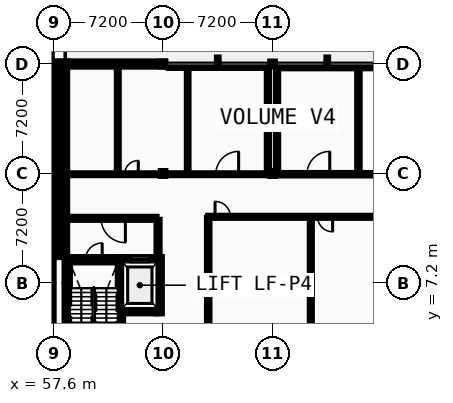
"""IFC4 building model, lengths in metres.
Left out: names, types, materials, properties, quantities, classifications, styles, units other than length and angle.
Written with IfcOpenShell. Run it as: python <this file> out.ifc"""

import sys

from ifc_helpers import new_model, si_unit, direction, frame, frame_2d, origin, origin_2d, place, context, subcontext, project, spatial, rectangle, i_section, extrude, element, fill, save


model = new_model("IFC4")
c1 = context("Model", 3, precision=1e-05, world=origin(), true_north=direction((0.0, 1.0)))
c2 = subcontext(c1, "Body", "Model", "MODEL_VIEW")
j1 = project(units=[si_unit("LENGTHUNIT", "METRE"), si_unit("PLANEANGLEUNIT", "RADIAN")], contexts=[c1])
p1 = place(None, origin())
s1 = spatial("IfcSite", under=j1, at=p1, CompositionType="ELEMENT")
p2 = place(p1, origin())
s2 = spatial("IfcBuilding", under=s1, at=p2, CompositionType="ELEMENT")
p3 = place(p2, frame((0.0, 0.0, 14.0)))
s3 = spatial("IfcBuildingStorey", under=s2, at=p3, CompositionType="ELEMENT", Elevation=14.0)
for number, where, z_axis, x_axis in (
    (1, (57.6, 14.4, 0.0), (0.0, 0.0, 1.0), (1.0, 0.0, 0.0)),
    (2, (57.6, 21.6, 0.0), (0.0, 0.0, 1.0), (1.0, 0.0, 0.0)),
    (3, (58.32, 14.4, 0.0), (0.0, 0.0, 1.0), (1.0, 0.0, 0.0)),
    (4, (58.32, 21.6, 0.0), (0.0, 0.0, 1.0), (1.0, 0.0, 0.0)),
    (5, (64.8, 14.4, 0.0), (0.0, 0.0, 1.0), (1.0, 0.0, 0.0)),
    (6, (64.8, 21.6, 0.0), (0.0, 0.0, 1.0), (1.0, 0.0, 0.0)),
    (7, (72.0, 7.2, 0.0), (0.0, 0.0, 1.0), (1.0, 0.0, 0.0)),
    (8, (72.0, 14.4, 0.0), (0.0, 0.0, 1.0), (1.0, 0.0, 0.0)),
    (9, (72.0, 21.6, 0.0), (0.0, 0.0, 1.0), (1.0, 0.0, 0.0)),
):
    element("IfcColumn", number, at=place(p3, frame(where, z_axis=z_axis, x_axis=x_axis)), inside=s3, PredefinedType="COLUMN", context=c2, shape_type="SweptSolid", body=[
        extrude(i_section(OverallWidth=0.3, OverallDepth=0.32, WebThickness=0.011, FlangeThickness=0.021, FilletRadius=0.027, at=origin_2d()), origin(), (0.0, 0.0, 1.0), 4.4),
    ])
p4 = place(p3, frame((57.6, 8.9, 0.0), z_axis=(0.0, 0.0, 1.0), x_axis=(0.0, 1.0, 0.0)))
e10 = element("IfcWall", 10, at=p4, inside=s3, PredefinedType="STANDARD", context=c2, shape_type="SweptSolid", body=[
    extrude(rectangle(XDim=5.5, YDim=0.34, at=frame_2d((2.75, 0.0))), origin(), (0.0, 0.0, 1.0), 4.2),
])
p5 = place(p3, frame((57.6, 14.4, 0.0), z_axis=(0.0, 0.0, 1.0), x_axis=(0.0, 1.0, 0.0)))
e11 = element("IfcWall", 11, at=p5, inside=s3, PredefinedType="STANDARD", context=c2, shape_type="SweptSolid", body=[
    extrude(rectangle(XDim=7.37, YDim=0.34, at=frame_2d((3.685, 0.0))), origin(), (0.0, 0.0, 1.0), 3.895),
])
p6 = place(p5, frame((1.679, 0.0, 0.95)))
e12 = element("IfcOpeningElement", 12, at=p6, cuts=e11, PredefinedType="OPENING", context=c2, shape_type="SweptSolid", body=[
    extrude(rectangle(XDim=1.064, YDim=1.404, at=frame_2d((0.532, 0.702))), frame((0.0, 0.18, 0.0), z_axis=(0.0, -1.0, 0.0), x_axis=(1.0, 0.0, 0.0)), (0.0, 0.0, 1.0), 0.36),
])
p7 = place(p5, frame((4.627, 0.0, 0.95)))
e13 = element("IfcOpeningElement", 13, at=p7, cuts=e11, PredefinedType="OPENING", context=c2, shape_type="SweptSolid", body=[
    extrude(rectangle(XDim=1.064, YDim=1.404, at=frame_2d((0.532, 0.702))), frame((0.0, 0.18, 0.0), z_axis=(0.0, -1.0, 0.0), x_axis=(1.0, 0.0, 0.0)), (0.0, 0.0, 1.0), 0.36),
])
p8 = place(p3, frame((64.91, 21.6, 0.0), z_axis=(0.0, 0.0, 1.0), x_axis=(-1.0, 0.0, 0.0)))
e14 = element("IfcWall", 14, at=p8, inside=s3, PredefinedType="STANDARD", context=c2, shape_type="SweptSolid", body=[
    extrude(rectangle(XDim=6.42, YDim=0.34, at=frame_2d((3.21, 0.0))), origin(), (0.0, 0.0, 1.0), 3.935),
])
p9 = place(p3, frame((58.32, 14.4, 0.0), z_axis=(0.0, 0.0, 1.0), x_axis=(0.0, -1.0, 0.0)))
e15 = element("IfcWall", 15, at=p9, inside=s3, PredefinedType="STANDARD", context=c2, shape_type="SweptSolid", body=[
    extrude(rectangle(XDim=5.5, YDim=0.34, at=frame_2d((2.75, 0.0))), origin(), (0.0, 0.0, 1.0), 4.2),
])
p10 = place(p3, frame((58.32, 21.77, 0.0), z_axis=(0.0, 0.0, 1.0), x_axis=(0.0, -1.0, 0.0)))
e16 = element("IfcWall", 16, at=p10, inside=s3, PredefinedType="STANDARD", context=c2, shape_type="SweptSolid", body=[
    extrude(rectangle(XDim=7.37, YDim=0.34, at=frame_2d((3.685, 0.0))), origin(), (0.0, 0.0, 1.0), 3.895),
])
p11 = place(p10, frame((1.764, 0.0, 0.95)))
e17 = element("IfcOpeningElement", 17, at=p11, cuts=e16, PredefinedType="OPENING", context=c2, shape_type="SweptSolid", body=[
    extrude(rectangle(XDim=0.894, YDim=1.368, at=frame_2d((0.447, 0.684))), frame((0.0, 0.18, 0.0), z_axis=(0.0, -1.0, 0.0), x_axis=(1.0, 0.0, 0.0)), (0.0, 0.0, 1.0), 0.36),
])
p12 = place(p10, frame((4.712, 0.0, 0.95)))
e18 = element("IfcOpeningElement", 18, at=p12, cuts=e16, PredefinedType="OPENING", context=c2, shape_type="SweptSolid", body=[
    extrude(rectangle(XDim=0.894, YDim=1.368, at=frame_2d((0.447, 0.684))), frame((0.0, 0.18, 0.0), z_axis=(0.0, -1.0, 0.0), x_axis=(1.0, 0.0, 0.0)), (0.0, 0.0, 1.0), 0.36),
])
p13 = place(p3, frame((57.425, 0.4, 0.0), z_axis=(0.0, 0.0, 1.0), x_axis=(0.0, 1.0, 0.0)))
e19 = element("IfcWall", 19, at=p13, inside=s3, PredefinedType="SHEAR", context=c2, shape_type="SweptSolid", body=[
    extrude(rectangle(XDim=8.5, YDim=0.35, at=frame_2d((4.25, 0.0))), origin(), (0.0, 0.0, 1.0), 4.2),
])
p14 = place(p3, frame((58.67, 8.725, 0.0), z_axis=(0.0, 0.0, 1.0), x_axis=(1.0, 0.0, 0.0)))
e20 = element("IfcWall", 20, at=p14, inside=s3, PredefinedType="SHEAR", context=c2, shape_type="SweptSolid", body=[
    extrude(rectangle(XDim=3.15, YDim=0.35, at=frame_2d((1.575, 0.0))), origin(), (0.0, 0.0, 1.0), 4.2),
])
p15 = place(p14, frame((1.025, 0.0, 0.0)))
e21 = element("IfcOpeningElement", 21, at=p15, cuts=e20, PredefinedType="OPENING", context=c2, shape_type="SweptSolid", body=[
    extrude(rectangle(XDim=1.1, YDim=2.15, at=frame_2d((0.55, 1.075))), frame((0.0, 0.185, 0.0), z_axis=(0.0, -1.0, 0.0), x_axis=(1.0, 0.0, 0.0)), (0.0, 0.0, 1.0), 0.37),
])
for number, where, z_axis, x_axis in (
    (22, (58.495, 0.4, 0.0), (0.0, 0.0, 1.0), (0.0, 1.0, 0.0)),
    (23, (61.995, 0.4, 0.0), (0.0, 0.0, 1.0), (0.0, 1.0, 0.0)),
):
    element("IfcWall", number, at=place(p3, frame(where, z_axis=z_axis, x_axis=x_axis)), inside=s3, PredefinedType="SHEAR", context=c2, shape_type="SweptSolid", body=[
        extrude(rectangle(XDim=8.5, YDim=0.35, at=frame_2d((4.25, 0.0))), origin(), (0.0, 0.0, 1.0), 4.2),
    ])
p16 = place(p3, frame((62.17, 5.375, 0.0), z_axis=(0.0, 0.0, 1.0), x_axis=(1.0, 0.0, 0.0)))
e24 = element("IfcWall", 24, at=p16, inside=s3, PredefinedType="SHEAR", context=c2, shape_type="SweptSolid", body=[
    extrude(rectangle(XDim=2.2, YDim=0.35, at=frame_2d((1.1, 0.0))), origin(), (0.0, 0.0, 1.0), 4.2),
])
p17 = place(p3, frame((62.17, 8.725, 0.0), z_axis=(0.0, 0.0, 1.0), x_axis=(1.0, 0.0, 0.0)))
e25 = element("IfcWall", 25, at=p17, inside=s3, PredefinedType="SHEAR", context=c2, shape_type="SweptSolid", body=[
    extrude(rectangle(XDim=2.2, YDim=0.35, at=frame_2d((1.1, 0.0))), origin(), (0.0, 0.0, 1.0), 4.2),
])
p18 = place(p17, frame((0.5, 0.0, 0.0)))
e26 = element("IfcOpeningElement", 26, at=p18, cuts=e25, PredefinedType="OPENING", context=c2, shape_type="SweptSolid", body=[
    extrude(rectangle(XDim=1.2, YDim=2.2, at=frame_2d((0.6, 1.1))), frame((0.0, 0.185, 0.0), z_axis=(0.0, -1.0, 0.0), x_axis=(1.0, 0.0, 0.0)), (0.0, 0.0, 1.0), 0.37),
])
p19 = place(p3, frame((64.545, 5.2, 0.0), z_axis=(0.0, 0.0, 1.0), x_axis=(0.0, 1.0, 0.0)))
e27 = element("IfcWall", 27, at=p19, inside=s3, PredefinedType="SHEAR", context=c2, shape_type="SweptSolid", body=[
    extrude(rectangle(XDim=3.7, YDim=0.35, at=frame_2d((1.85, 0.0))), origin(), (0.0, 0.0, 1.0), 4.2),
])
p20 = place(p3, frame((58.67, 11.45, 0.0), z_axis=(0.0, 0.0, 1.0), x_axis=(1.0, 0.0, 0.0)))
e28 = element("IfcWall", 28, at=p20, inside=s3, PredefinedType="PARTITIONING", context=c2, shape_type="SweptSolid", body=[
    extrude(rectangle(XDim=5.7, YDim=0.2, at=frame_2d((2.85, 0.0))), origin(), (0.0, 0.0, 1.0), 4.2),
])
p21 = place(p20, frame((2.05, 0.0, 0.0)))
e29 = element("IfcOpeningElement", 29, at=p21, cuts=e28, PredefinedType="OPENING", context=c2, shape_type="SweptSolid", body=[
    extrude(rectangle(XDim=1.6, YDim=2.2, at=frame_2d((0.8, 1.1))), frame((0.0, 0.11, 0.0), z_axis=(0.0, -1.0, 0.0), x_axis=(1.0, 0.0, 0.0)), (0.0, 0.0, 1.0), 0.22),
])
p22 = place(p3, frame((64.47, 8.9, 0.0), z_axis=(0.0, 0.0, 1.0), x_axis=(0.0, 1.0, 0.0)))
e30 = element("IfcWall", 30, at=p22, inside=s3, PredefinedType="PARTITIONING", context=c2, shape_type="SweptSolid", body=[
    extrude(rectangle(XDim=2.45, YDim=0.2, at=frame_2d((1.225, 0.0))), origin(), (0.0, 0.0, 1.0), 4.2),
])
p23 = place(p3, frame((67.77, 11.55, 0.0), z_axis=(0.0, 0.0, 1.0), x_axis=(1.0, 0.0, 0.0)))
e31 = element("IfcWall", 31, at=p23, inside=s3, PredefinedType="PARTITIONING", context=c2, shape_type="SweptSolid", body=[
    extrude(rectangle(XDim=12.46, YDim=0.135, at=frame_2d((6.23, 0.0))), origin(), (0.0, 0.0, 1.0), 4.2),
])
p24 = place(p23, frame((7.2, 0.0, 0.0)))
e32 = element("IfcOpeningElement", 32, at=p24, cuts=e31, PredefinedType="OPENING", context=c2, shape_type="SweptSolid", body=[
    extrude(rectangle(XDim=0.984, YDim=2.04, at=frame_2d((0.492, 1.02))), frame((0.0, 0.078, 0.0), z_axis=(0.0, -1.0, 0.0), x_axis=(1.0, 0.0, 0.0)), (0.0, 0.0, 1.0), 0.155),
])
p25 = place(p23, frame((0.45, 0.0, 0.0)))
e33 = element("IfcOpeningElement", 33, at=p25, cuts=e31, PredefinedType="OPENING", context=c2, shape_type="SweptSolid", body=[
    extrude(rectangle(XDim=1.01, YDim=2.04, at=frame_2d((0.505, 1.02))), frame((0.0, 0.078, 0.0), z_axis=(0.0, -1.0, 0.0), x_axis=(1.0, 0.0, 0.0)), (0.0, 0.0, 1.0), 0.155),
])
p26 = place(p3, frame((58.7, 14.35, 0.0), z_axis=(0.0, 0.0, 1.0), x_axis=(1.0, 0.0, 0.0)))
e34 = element("IfcWall", 34, at=p26, inside=s3, PredefinedType="PARTITIONING", context=c2, shape_type="SweptSolid", body=[
    extrude(rectangle(XDim=5.72, YDim=0.125, at=frame_2d((2.86, 0.0))), origin(), (0.0, 0.0, 1.0), 3.935),
])
p27 = place(p26, frame((1.67, 0.0, 0.0)))
e35 = element("IfcOpeningElement", 35, at=p27, cuts=e34, PredefinedType="OPENING", context=c2, shape_type="SweptSolid", body=[
    extrude(rectangle(XDim=1.0, YDim=2.1, at=frame_2d((0.5, 1.05))), frame((0.0, 0.073, 0.0), z_axis=(0.0, -1.0, 0.0), x_axis=(1.0, 0.0, 0.0)), (0.0, 0.0, 1.0), 0.145),
])
p28 = place(p26, frame((3.57, 0.0, 0.0)))
e36 = element("IfcOpeningElement", 36, at=p28, cuts=e34, PredefinedType="OPENING", context=c2, shape_type="SweptSolid", body=[
    extrude(rectangle(XDim=0.9, YDim=2.1, at=frame_2d((0.45, 1.05))), frame((0.0, 0.073, 0.0), z_axis=(0.0, -1.0, 0.0), x_axis=(1.0, 0.0, 0.0)), (0.0, 0.0, 1.0), 0.145),
])
p29 = place(p3, frame((65.18, 14.35, 0.0), z_axis=(0.0, 0.0, 1.0), x_axis=(1.0, 0.0, 0.0)))
e37 = element("IfcWall", 37, at=p29, inside=s3, PredefinedType="PARTITIONING", context=c2, shape_type="SweptSolid", body=[
    extrude(rectangle(XDim=6.44, YDim=0.125, at=frame_2d((3.22, 0.0))), origin(), (0.0, 0.0, 1.0), 3.935),
])
p30 = place(p29, frame((3.09, 0.0, 0.0)))
e38 = element("IfcOpeningElement", 38, at=p30, cuts=e37, PredefinedType="OPENING", context=c2, shape_type="SweptSolid", body=[
    extrude(rectangle(XDim=1.5, YDim=2.2, at=frame_2d((0.75, 1.1))), frame((0.0, 0.073, 0.0), z_axis=(0.0, -1.0, 0.0), x_axis=(1.0, 0.0, 0.0)), (0.0, 0.0, 1.0), 0.145),
])
p31 = place(p3, frame((72.38, 14.35, 0.0), z_axis=(0.0, 0.0, 1.0), x_axis=(1.0, 0.0, 0.0)))
e39 = element("IfcWall", 39, at=p31, inside=s3, PredefinedType="PARTITIONING", context=c2, shape_type="SweptSolid", body=[
    extrude(rectangle(XDim=6.44, YDim=0.16, at=frame_2d((3.22, 0.0))), origin(), (0.0, 0.0, 1.0), 3.935),
])
p32 = place(p31, frame((1.885, 0.0, 0.0)))
e40 = element("IfcOpeningElement", 40, at=p32, cuts=e39, PredefinedType="OPENING", context=c2, shape_type="SweptSolid", body=[
    extrude(rectangle(XDim=1.5, YDim=2.2, at=frame_2d((0.75, 1.1))), frame((0.0, 0.09, 0.0), z_axis=(0.0, -1.0, 0.0), x_axis=(1.0, 0.0, 0.0)), (0.0, 0.0, 1.0), 0.18),
])
p33 = place(p3, frame((65.18, 21.4, 0.0), z_axis=(0.0, 0.0, 1.0), x_axis=(1.0, 0.0, 0.0)))
e41 = element("IfcWall", 41, at=p33, inside=s3, PredefinedType="PARTITIONING", context=c2, shape_type="SweptSolid", body=[
    extrude(rectangle(XDim=6.44, YDim=0.11, at=frame_2d((3.22, 0.0))), origin(), (0.0, 0.0, 1.0), 3.935),
])
p34 = place(p3, frame((72.38, 21.4, 0.0), z_axis=(0.0, 0.0, 1.0), x_axis=(1.0, 0.0, 0.0)))
e42 = element("IfcWall", 42, at=p34, inside=s3, PredefinedType="PARTITIONING", context=c2, shape_type="SweptSolid", body=[
    extrude(rectangle(XDim=6.44, YDim=0.16, at=frame_2d((3.22, 0.0))), origin(), (0.0, 0.0, 1.0), 3.935),
])
p35 = place(p3, frame((61.82, 14.413, 0.0), z_axis=(0.0, 0.0, 1.0), x_axis=(0.0, 1.0, 0.0)))
e43 = element("IfcWall", 43, at=p35, inside=s3, PredefinedType="PARTITIONING", context=c2, shape_type="SweptSolid", body=[
    extrude(rectangle(XDim=6.987, YDim=0.125, at=frame_2d((3.494, 0.0))), origin(), (0.0, 0.0, 1.0), 4.2),
])
p36 = place(p3, frame((66.42, 14.413, 0.0), z_axis=(0.0, 0.0, 1.0), x_axis=(0.0, 1.0, 0.0)))
e44 = element("IfcWall", 44, at=p36, inside=s3, PredefinedType="PARTITIONING", context=c2, shape_type="SweptSolid", body=[
    extrude(rectangle(XDim=6.932, YDim=0.11, at=frame_2d((3.466, 0.0))), origin(), (0.0, 0.0, 1.0), 4.2),
])
p37 = place(p3, frame((67.77, 3.36, 0.0), z_axis=(0.0, 0.0, 1.0), x_axis=(0.0, 1.0, 0.0)))
e45 = element("IfcWall", 45, at=p37, inside=s3, PredefinedType="PARTITIONING", context=c2, shape_type="SweptSolid", body=[
    extrude(rectangle(XDim=8.122, YDim=0.16, at=frame_2d((4.061, 0.0))), origin(), (0.0, 0.0, 1.0), 4.2),
])
p38 = place(p3, frame((71.7, 14.78, 0.0), z_axis=(0.0, 0.0, 1.0), x_axis=(0.0, 1.0, 0.0)))
e46 = element("IfcWall", 46, at=p38, inside=s3, PredefinedType="PARTITIONING", context=c2, shape_type="SweptSolid", body=[
    extrude(rectangle(XDim=6.44, YDim=0.15, at=frame_2d((3.22, 0.0))), origin(), (0.0, 0.0, 1.0), 3.895),
])
p39 = place(p3, frame((72.3, 14.78, 0.0), z_axis=(0.0, 0.0, 1.0), x_axis=(0.0, 1.0, 0.0)))
e47 = element("IfcWall", 47, at=p39, inside=s3, PredefinedType="PARTITIONING", context=c2, shape_type="SweptSolid", body=[
    extrude(rectangle(XDim=6.44, YDim=0.142, at=frame_2d((3.22, 0.0))), origin(), (0.0, 0.0, 1.0), 3.895),
])
p40 = place(p3, frame((74.52, 0.2, 0.0), z_axis=(0.0, 0.0, 1.0), x_axis=(0.0, 1.0, 0.0)))
e48 = element("IfcWall", 48, at=p40, inside=s3, PredefinedType="PARTITIONING", context=c2, shape_type="SweptSolid", body=[
    extrude(rectangle(XDim=11.282, YDim=0.135, at=frame_2d((5.641, 0.0))), origin(), (0.0, 0.0, 1.0), 3.945),
])
p41 = place(p3, frame((77.65, 14.43, 0.0), z_axis=(0.0, 0.0, 1.0), x_axis=(0.0, 1.0, 0.0)))
e49 = element("IfcWall", 49, at=p41, inside=s3, PredefinedType="PARTITIONING", context=c2, shape_type="SweptSolid", body=[
    extrude(rectangle(XDim=6.89, YDim=0.16, at=frame_2d((3.445, 0.0))), origin(), (0.0, 0.0, 1.0), 4.2),
])
p42 = place(p6, origin())
e50 = element("IfcWindow", 50, at=p42, inside=s3, PartitioningType="SINGLE_PANEL", PredefinedType="WINDOW", context=c2, shape_type="SweptSolid", body=[
    extrude(rectangle(XDim=1.064, YDim=1.404, at=frame_2d((0.532, 0.702))), frame((0.0, 0.03, 0.0), z_axis=(0.0, -1.0, 0.0), x_axis=(1.0, 0.0, 0.0)), (0.0, 0.0, 1.0), 0.06),
])
fill(e12, e50)
p43 = place(p7, origin())
e51 = element("IfcWindow", 51, at=p43, inside=s3, PartitioningType="SINGLE_PANEL", PredefinedType="WINDOW", context=c2, shape_type="SweptSolid", body=[
    extrude(rectangle(XDim=1.064, YDim=1.404, at=frame_2d((0.532, 0.702))), frame((0.0, 0.03, 0.0), z_axis=(0.0, -1.0, 0.0), x_axis=(1.0, 0.0, 0.0)), (0.0, 0.0, 1.0), 0.06),
])
fill(e13, e51)
p44 = place(p11, origin())
e52 = element("IfcWindow", 52, at=p44, inside=s3, PartitioningType="SINGLE_PANEL", PredefinedType="WINDOW", context=c2, shape_type="SweptSolid", body=[
    extrude(rectangle(XDim=0.894, YDim=1.368, at=frame_2d((0.447, 0.684))), frame((0.0, 0.03, 0.0), z_axis=(0.0, -1.0, 0.0), x_axis=(1.0, 0.0, 0.0)), (0.0, 0.0, 1.0), 0.06),
])
fill(e17, e52)
p45 = place(p12, origin())
e53 = element("IfcWindow", 53, at=p45, inside=s3, PartitioningType="SINGLE_PANEL", PredefinedType="WINDOW", context=c2, shape_type="SweptSolid", body=[
    extrude(rectangle(XDim=0.894, YDim=1.368, at=frame_2d((0.447, 0.684))), frame((0.0, 0.03, 0.0), z_axis=(0.0, -1.0, 0.0), x_axis=(1.0, 0.0, 0.0)), (0.0, 0.0, 1.0), 0.06),
])
fill(e18, e53)
p46 = place(p15, frame((1.1, 0.0, 0.0), z_axis=(0.0, 0.0, 1.0), x_axis=(-1.0, 0.0, 0.0)))
e54 = element("IfcDoor", 54, at=p46, inside=s3, OperationType="SINGLE_SWING_RIGHT", PredefinedType="DOOR", context=c2, shape_type="SweptSolid", body=[
    extrude(rectangle(XDim=1.1, YDim=2.15, at=frame_2d((0.55, 1.075))), frame((0.0, 0.025, 0.0), z_axis=(0.0, -1.0, 0.0), x_axis=(1.0, 0.0, 0.0)), (0.0, 0.0, 1.0), 0.05),
])
fill(e21, e54)
p47 = place(p18, origin())
e55 = element("IfcDoor", 55, at=p47, inside=s3, OperationType="SLIDING_TO_RIGHT", PredefinedType="DOOR", context=c2, shape_type="SweptSolid", body=[
    extrude(rectangle(XDim=1.2, YDim=2.2, at=frame_2d((0.6, 1.1))), frame((0.0, 0.025, 0.0), z_axis=(0.0, -1.0, 0.0), x_axis=(1.0, 0.0, 0.0)), (0.0, 0.0, 1.0), 0.05),
])
fill(e26, e55)
p48 = place(p21, origin())
e56 = element("IfcDoor", 56, at=p48, inside=s3, OperationType="DOUBLE_DOOR_SINGLE_SWING", PredefinedType="DOOR", context=c2, shape_type="SweptSolid", body=[
    extrude(rectangle(XDim=1.6, YDim=2.2, at=frame_2d((0.8, 1.1))), frame((0.0, 0.025, 0.0), z_axis=(0.0, -1.0, 0.0), x_axis=(1.0, 0.0, 0.0)), (0.0, 0.0, 1.0), 0.05),
])
fill(e29, e56)
p49 = place(p27, frame((1.0, 0.0, 0.0), z_axis=(0.0, 0.0, 1.0), x_axis=(-1.0, 0.0, 0.0)))
e57 = element("IfcDoor", 57, at=p49, inside=s3, OperationType="SLIDING_TO_LEFT", PredefinedType="DOOR", context=c2, shape_type="SweptSolid", body=[
    extrude(rectangle(XDim=1.0, YDim=2.1, at=frame_2d((0.5, 1.05))), frame((0.0, 0.025, 0.0), z_axis=(0.0, -1.0, 0.0), x_axis=(1.0, 0.0, 0.0)), (0.0, 0.0, 1.0), 0.05),
])
fill(e35, e57)
p50 = place(p28, frame((0.9, 0.0, 0.0), z_axis=(0.0, 0.0, 1.0), x_axis=(-1.0, 0.0, 0.0)))
e58 = element("IfcDoor", 58, at=p50, inside=s3, OperationType="SINGLE_SWING_RIGHT", PredefinedType="DOOR", context=c2, shape_type="SweptSolid", body=[
    extrude(rectangle(XDim=0.9, YDim=2.1, at=frame_2d((0.45, 1.05))), frame((0.0, 0.025, 0.0), z_axis=(0.0, -1.0, 0.0), x_axis=(1.0, 0.0, 0.0)), (0.0, 0.0, 1.0), 0.05),
])
fill(e36, e58)
p51 = place(p30, frame((1.5, 0.0, 0.0), z_axis=(0.0, 0.0, 1.0), x_axis=(-1.0, 0.0, 0.0)))
e59 = element("IfcDoor", 59, at=p51, inside=s3, OperationType="DOUBLE_DOOR_SINGLE_SWING", PredefinedType="DOOR", context=c2, shape_type="SweptSolid", body=[
    extrude(rectangle(XDim=1.5, YDim=2.2, at=frame_2d((0.75, 1.1))), frame((0.0, 0.025, 0.0), z_axis=(0.0, -1.0, 0.0), x_axis=(1.0, 0.0, 0.0)), (0.0, 0.0, 1.0), 0.05),
])
fill(e38, e59)
p52 = place(p32, frame((1.5, 0.0, 0.0), z_axis=(0.0, 0.0, 1.0), x_axis=(-1.0, 0.0, 0.0)))
e60 = element("IfcDoor", 60, at=p52, inside=s3, OperationType="DOUBLE_DOOR_SINGLE_SWING", PredefinedType="DOOR", context=c2, shape_type="SweptSolid", body=[
    extrude(rectangle(XDim=1.5, YDim=2.2, at=frame_2d((0.75, 1.1))), frame((0.0, 0.025, 0.0), z_axis=(0.0, -1.0, 0.0), x_axis=(1.0, 0.0, 0.0)), (0.0, 0.0, 1.0), 0.05),
])
fill(e40, e60)
p53 = place(p24, origin())
e61 = element("IfcDoor", 61, at=p53, inside=s3, OperationType="SINGLE_SWING_RIGHT", PredefinedType="DOOR", context=c2, shape_type="SweptSolid", body=[
    extrude(rectangle(XDim=0.984, YDim=2.04, at=frame_2d((0.492, 1.02))), frame((0.0, 0.025, 0.0), z_axis=(0.0, -1.0, 0.0), x_axis=(1.0, 0.0, 0.0)), (0.0, 0.0, 1.0), 0.05),
])
fill(e32, e61)
p54 = place(p25, origin())
e62 = element("IfcDoor", 62, at=p54, inside=s3, OperationType="SINGLE_SWING_LEFT", PredefinedType="DOOR", context=c2, shape_type="SweptSolid", body=[
    extrude(rectangle(XDim=1.01, YDim=2.04, at=frame_2d((0.505, 1.02))), frame((0.0, 0.025, 0.0), z_axis=(0.0, -1.0, 0.0), x_axis=(1.0, 0.0, 0.0)), (0.0, 0.0, 1.0), 0.05),
])
fill(e33, e62)
save(model, sys.argv[1])
